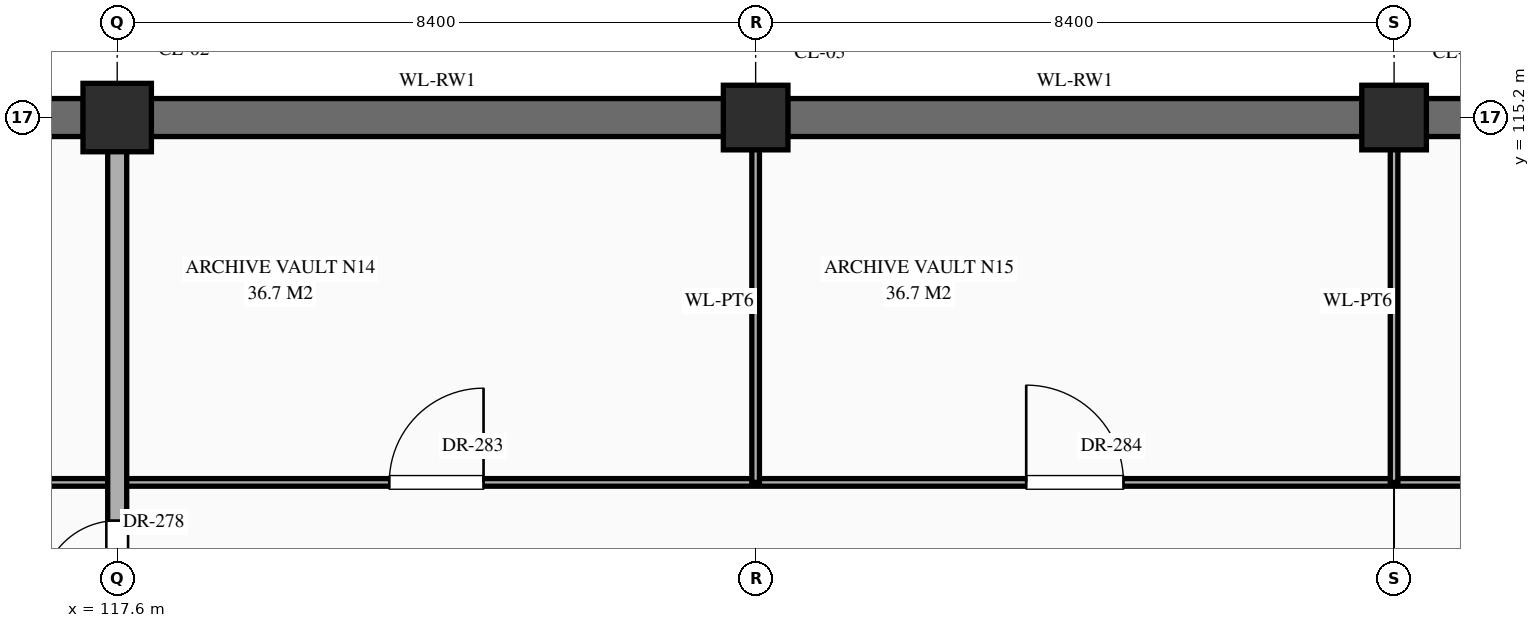
"""IFC4 building model, lengths in metres.
Left out: names, types, materials, properties, quantities, classifications, styles, units other than length and angle.
Written with IfcOpenShell. Run it as: python <this file> out.ifc"""

import sys

from ifc_helpers import new_model, si_unit, direction, frame, frame_2d, origin, origin_2d, place, context, subcontext, project, spatial, rectangle, extrude, element, fill, save


model = new_model("IFC4")
c1 = context("Model", 3, precision=1e-05, world=origin(), true_north=direction((0.0, 1.0)))
c2 = subcontext(c1, "Body", "Model", "MODEL_VIEW")
j1 = project(units=[si_unit("LENGTHUNIT", "METRE"), si_unit("PLANEANGLEUNIT", "RADIAN")], contexts=[c1])
p1 = place(None, origin())
s1 = spatial("IfcSite", under=j1, at=p1, CompositionType="ELEMENT")
p2 = place(p1, origin())
s2 = spatial("IfcBuilding", under=s1, at=p2, CompositionType="ELEMENT")
p3 = place(p2, frame((0.0, 0.0, -10.2)))
s3 = spatial("IfcBuildingStorey", under=s2, at=p3, CompositionType="ELEMENT", Elevation=-10.2)
p4 = place(p3, frame((117.6, 115.2, 0.0), z_axis=(0.0, 0.0, 1.0), x_axis=(1.0, 0.0, 0.0)))
e1 = element("IfcColumn", 1, at=p4, inside=s3, PredefinedType="COLUMN", context=c2, shape_type="SweptSolid", body=[
    extrude(rectangle(XDim=0.9, YDim=0.9, at=origin_2d()), origin(), (0.0, 0.0, 1.0), 4.8),
])
for number, where, z_axis, x_axis in (
    (2, (126.0, 115.2, 0.0), (0.0, 0.0, 1.0), (1.0, 0.0, 0.0)),
    (3, (134.4, 115.2, 0.0), (0.0, 0.0, 1.0), (1.0, 0.0, 0.0)),
):
    element("IfcColumn", number, at=place(p3, frame(where, z_axis=z_axis, x_axis=x_axis)), inside=s3, PredefinedType="COLUMN", context=c2, shape_type="SweptSolid", body=[
        extrude(rectangle(XDim=0.85, YDim=0.85, at=origin_2d()), origin(), (0.0, 0.0, 1.0), 4.8),
    ])
p5 = place(p3, frame((109.645, 115.2, 0.0), z_axis=(0.0, 0.0, 1.0), x_axis=(1.0, 0.0, 0.0)))
e4 = element("IfcWall", 4, at=p5, inside=s3, PredefinedType="USERDEFINED", context=c2, shape_type="SweptSolid", body=[
    extrude(rectangle(XDim=7.51, YDim=0.5, at=frame_2d((3.755, 0.0))), origin(), (0.0, 0.0, 1.0), 4.48),
])
p6 = place(p3, frame((118.045, 115.2, 0.0), z_axis=(0.0, 0.0, 1.0), x_axis=(1.0, 0.0, 0.0)))
e5 = element("IfcWall", 5, at=p6, inside=s3, PredefinedType="USERDEFINED", context=c2, shape_type="SweptSolid", body=[
    extrude(rectangle(XDim=7.535, YDim=0.5, at=frame_2d((3.768, 0.0))), origin(), (0.0, 0.0, 1.0), 4.48),
])
p7 = place(p3, frame((126.42, 115.2, 0.0), z_axis=(0.0, 0.0, 1.0), x_axis=(1.0, 0.0, 0.0)))
e6 = element("IfcWall", 6, at=p7, inside=s3, PredefinedType="USERDEFINED", context=c2, shape_type="SweptSolid", body=[
    extrude(rectangle(XDim=7.56, YDim=0.5, at=frame_2d((3.78, 0.0))), origin(), (0.0, 0.0, 1.0), 4.48),
])
p8 = place(p3, frame((134.82, 115.2, 0.0), z_axis=(0.0, 0.0, 1.0), x_axis=(1.0, 0.0, 0.0)))
e7 = element("IfcWall", 7, at=p8, inside=s3, PredefinedType="USERDEFINED", context=c2, shape_type="SweptSolid", body=[
    extrude(rectangle(XDim=7.56, YDim=0.5, at=frame_2d((3.78, 0.0))), origin(), (0.0, 0.0, 1.0), 4.48),
])
p9 = place(p3, frame((0.04, 110.4, 0.0), z_axis=(0.0, 0.0, 1.0), x_axis=(1.0, 0.0, 0.0)))
e8 = element("IfcWall", 8, at=p9, inside=s3, PredefinedType="STANDARD", context=c2, shape_type="SweptSolid", body=[
    extrude(rectangle(XDim=167.92, YDim=0.1, at=frame_2d((83.96, 0.0))), origin(), (0.0, 0.0, 1.0), 4.48),
])
p10 = place(p9, frame((3.54, 0.0, 0.0)))
e9 = element("IfcOpeningElement", 9, at=p10, cuts=e8, PredefinedType="OPENING", context=c2, shape_type="SweptSolid", body=[
    extrude(rectangle(XDim=1.28, YDim=2.35, at=frame_2d((0.64, 1.175))), frame((0.0, 0.062, 0.0), z_axis=(0.0, -1.0, 0.0), x_axis=(1.0, 0.0, 0.0)), (0.0, 0.0, 1.0), 0.124),
])
p11 = place(p9, frame((12.09, 0.0, 0.0)))
e10 = element("IfcOpeningElement", 10, at=p11, cuts=e8, PredefinedType="OPENING", context=c2, shape_type="SweptSolid", body=[
    extrude(rectangle(XDim=0.94, YDim=2.3, at=frame_2d((0.47, 1.15))), frame((0.0, 0.062, 0.0), z_axis=(0.0, -1.0, 0.0), x_axis=(1.0, 0.0, 0.0)), (0.0, 0.0, 1.0), 0.124),
])
p12 = place(p9, frame((20.47, 0.0, 0.0)))
e11 = element("IfcOpeningElement", 11, at=p12, cuts=e8, PredefinedType="OPENING", context=c2, shape_type="SweptSolid", body=[
    extrude(rectangle(XDim=0.98, YDim=2.35, at=frame_2d((0.49, 1.175))), frame((0.0, 0.062, 0.0), z_axis=(0.0, -1.0, 0.0), x_axis=(1.0, 0.0, 0.0)), (0.0, 0.0, 1.0), 0.124),
])
p13 = place(p9, frame((28.85, 0.0, 0.0)))
e12 = element("IfcOpeningElement", 12, at=p13, cuts=e8, PredefinedType="OPENING", context=c2, shape_type="SweptSolid", body=[
    extrude(rectangle(XDim=1.02, YDim=2.4, at=frame_2d((0.51, 1.2))), frame((0.0, 0.062, 0.0), z_axis=(0.0, -1.0, 0.0), x_axis=(1.0, 0.0, 0.0)), (0.0, 0.0, 1.0), 0.124),
])
p14 = place(p9, frame((37.23, 0.0, 0.0)))
e13 = element("IfcOpeningElement", 13, at=p14, cuts=e8, PredefinedType="OPENING", context=c2, shape_type="SweptSolid", body=[
    extrude(rectangle(XDim=1.06, YDim=2.4, at=frame_2d((0.53, 1.2))), frame((0.0, 0.062, 0.0), z_axis=(0.0, -1.0, 0.0), x_axis=(1.0, 0.0, 0.0)), (0.0, 0.0, 1.0), 0.124),
])
p15 = place(p9, frame((45.59, 0.0, 0.0)))
e14 = element("IfcOpeningElement", 14, at=p15, cuts=e8, PredefinedType="OPENING", context=c2, shape_type="SweptSolid", body=[
    extrude(rectangle(XDim=1.14, YDim=2.4, at=frame_2d((0.57, 1.2))), frame((0.0, 0.062, 0.0), z_axis=(0.0, -1.0, 0.0), x_axis=(1.0, 0.0, 0.0)), (0.0, 0.0, 1.0), 0.124),
])
p16 = place(p9, frame((54.13, 0.0, 0.0)))
e15 = element("IfcOpeningElement", 15, at=p16, cuts=e8, PredefinedType="OPENING", context=c2, shape_type="SweptSolid", body=[
    extrude(rectangle(XDim=0.86, YDim=2.1, at=frame_2d((0.43, 1.05))), frame((0.0, 0.062, 0.0), z_axis=(0.0, -1.0, 0.0), x_axis=(1.0, 0.0, 0.0)), (0.0, 0.0, 1.0), 0.124),
])
p17 = place(p9, frame((62.5, 0.0, 0.0)))
e16 = element("IfcOpeningElement", 16, at=p17, cuts=e8, PredefinedType="OPENING", context=c2, shape_type="SweptSolid", body=[
    extrude(rectangle(XDim=0.92, YDim=2.15, at=frame_2d((0.46, 1.075))), frame((0.0, 0.062, 0.0), z_axis=(0.0, -1.0, 0.0), x_axis=(1.0, 0.0, 0.0)), (0.0, 0.0, 1.0), 0.124),
])
p18 = place(p9, frame((70.88, 0.0, 0.0)))
e17 = element("IfcOpeningElement", 17, at=p18, cuts=e8, PredefinedType="OPENING", context=c2, shape_type="SweptSolid", body=[
    extrude(rectangle(XDim=0.96, YDim=2.2, at=frame_2d((0.48, 1.1))), frame((0.0, 0.062, 0.0), z_axis=(0.0, -1.0, 0.0), x_axis=(1.0, 0.0, 0.0)), (0.0, 0.0, 1.0), 0.124),
])
p19 = place(p9, frame((79.26, 0.0, 0.0)))
e18 = element("IfcOpeningElement", 18, at=p19, cuts=e8, PredefinedType="OPENING", context=c2, shape_type="SweptSolid", body=[
    extrude(rectangle(XDim=1.0, YDim=2.25, at=frame_2d((0.5, 1.125))), frame((0.0, 0.062, 0.0), z_axis=(0.0, -1.0, 0.0), x_axis=(1.0, 0.0, 0.0)), (0.0, 0.0, 1.0), 0.124),
])
p20 = place(p9, frame((87.62, 0.0, 0.0)))
e19 = element("IfcOpeningElement", 19, at=p20, cuts=e8, PredefinedType="OPENING", context=c2, shape_type="SweptSolid", body=[
    extrude(rectangle(XDim=1.08, YDim=2.25, at=frame_2d((0.54, 1.125))), frame((0.0, 0.062, 0.0), z_axis=(0.0, -1.0, 0.0), x_axis=(1.0, 0.0, 0.0)), (0.0, 0.0, 1.0), 0.124),
])
p21 = place(p9, frame((96.0, 0.0, 0.0)))
e20 = element("IfcOpeningElement", 20, at=p21, cuts=e8, PredefinedType="OPENING", context=c2, shape_type="SweptSolid", body=[
    extrude(rectangle(XDim=1.12, YDim=2.25, at=frame_2d((0.56, 1.125))), frame((0.0, 0.062, 0.0), z_axis=(0.0, -1.0, 0.0), x_axis=(1.0, 0.0, 0.0)), (0.0, 0.0, 1.0), 0.124),
])
p22 = place(p9, frame((104.38, 0.0, 0.0)))
e21 = element("IfcOpeningElement", 21, at=p22, cuts=e8, PredefinedType="OPENING", context=c2, shape_type="SweptSolid", body=[
    extrude(rectangle(XDim=1.16, YDim=2.3, at=frame_2d((0.58, 1.15))), frame((0.0, 0.062, 0.0), z_axis=(0.0, -1.0, 0.0), x_axis=(1.0, 0.0, 0.0)), (0.0, 0.0, 1.0), 0.124),
])
p23 = place(p9, frame((112.76, 0.0, 0.0)))
e22 = element("IfcOpeningElement", 22, at=p23, cuts=e8, PredefinedType="OPENING", context=c2, shape_type="SweptSolid", body=[
    extrude(rectangle(XDim=1.2, YDim=2.35, at=frame_2d((0.6, 1.175))), frame((0.0, 0.062, 0.0), z_axis=(0.0, -1.0, 0.0), x_axis=(1.0, 0.0, 0.0)), (0.0, 0.0, 1.0), 0.124),
])
p24 = place(p9, frame((121.14, 0.0, 0.0)))
e23 = element("IfcOpeningElement", 23, at=p24, cuts=e8, PredefinedType="OPENING", context=c2, shape_type="SweptSolid", body=[
    extrude(rectangle(XDim=1.24, YDim=2.3, at=frame_2d((0.62, 1.15))), frame((0.0, 0.062, 0.0), z_axis=(0.0, -1.0, 0.0), x_axis=(1.0, 0.0, 0.0)), (0.0, 0.0, 1.0), 0.124),
])
p25 = place(p9, frame((129.52, 0.0, 0.0)))
e24 = element("IfcOpeningElement", 24, at=p25, cuts=e8, PredefinedType="OPENING", context=c2, shape_type="SweptSolid", body=[
    extrude(rectangle(XDim=1.28, YDim=2.35, at=frame_2d((0.64, 1.175))), frame((0.0, 0.062, 0.0), z_axis=(0.0, -1.0, 0.0), x_axis=(1.0, 0.0, 0.0)), (0.0, 0.0, 1.0), 0.124),
])
p26 = place(p9, frame((138.09, 0.0, 0.0)))
e25 = element("IfcOpeningElement", 25, at=p26, cuts=e8, PredefinedType="OPENING", context=c2, shape_type="SweptSolid", body=[
    extrude(rectangle(XDim=0.94, YDim=2.3, at=frame_2d((0.47, 1.15))), frame((0.0, 0.062, 0.0), z_axis=(0.0, -1.0, 0.0), x_axis=(1.0, 0.0, 0.0)), (0.0, 0.0, 1.0), 0.124),
])
p27 = place(p9, frame((146.47, 0.0, 0.0)))
e26 = element("IfcOpeningElement", 26, at=p27, cuts=e8, PredefinedType="OPENING", context=c2, shape_type="SweptSolid", body=[
    extrude(rectangle(XDim=0.98, YDim=2.35, at=frame_2d((0.49, 1.175))), frame((0.0, 0.062, 0.0), z_axis=(0.0, -1.0, 0.0), x_axis=(1.0, 0.0, 0.0)), (0.0, 0.0, 1.0), 0.124),
])
p28 = place(p9, frame((154.85, 0.0, 0.0)))
e27 = element("IfcOpeningElement", 27, at=p28, cuts=e8, PredefinedType="OPENING", context=c2, shape_type="SweptSolid", body=[
    extrude(rectangle(XDim=1.02, YDim=2.4, at=frame_2d((0.51, 1.2))), frame((0.0, 0.062, 0.0), z_axis=(0.0, -1.0, 0.0), x_axis=(1.0, 0.0, 0.0)), (0.0, 0.0, 1.0), 0.124),
])
p29 = place(p9, frame((163.21, 0.0, 0.0)))
e28 = element("IfcOpeningElement", 28, at=p29, cuts=e8, PredefinedType="OPENING", context=c2, shape_type="SweptSolid", body=[
    extrude(rectangle(XDim=1.06, YDim=2.4, at=frame_2d((0.53, 1.2))), frame((0.0, 0.062, 0.0), z_axis=(0.0, -1.0, 0.0), x_axis=(1.0, 0.0, 0.0)), (0.0, 0.0, 1.0), 0.124),
])
p30 = place(p3, frame((117.6, 91.2, 0.0), z_axis=(0.0, 0.0, 1.0), x_axis=(0.0, 1.0, 0.0)))
e29 = element("IfcWall", 29, at=p30, inside=s3, PredefinedType="STANDARD", context=c2, shape_type="SweptSolid", body=[
    extrude(rectangle(XDim=23.96, YDim=0.25, at=frame_2d((11.98, 0.0))), origin(), (0.0, 0.0, 1.0), 3.73),
])
p31 = place(p30, frame((0.452, 0.0, 0.0)))
e30 = element("IfcOpeningElement", 30, at=p31, cuts=e29, PredefinedType="OPENING", context=c2, shape_type="SweptSolid", body=[
    extrude(rectangle(XDim=1.1, YDim=2.2, at=frame_2d((0.55, 1.1))), frame((0.0, 0.137, 0.0), z_axis=(0.0, -1.0, 0.0), x_axis=(1.0, 0.0, 0.0)), (0.0, 0.0, 1.0), 0.274),
])
p32 = place(p30, frame((10.498, 0.0, 0.0)))
e31 = element("IfcOpeningElement", 31, at=p32, cuts=e29, PredefinedType="OPENING", context=c2, shape_type="SweptSolid", body=[
    extrude(rectangle(XDim=1.0, YDim=2.2, at=frame_2d((0.5, 1.1))), frame((0.0, 0.137, 0.0), z_axis=(0.0, -1.0, 0.0), x_axis=(1.0, 0.0, 0.0)), (0.0, 0.0, 1.0), 0.274),
])
p33 = place(p30, frame((3.323, 0.0, 0.0)))
e32 = element("IfcOpeningElement", 32, at=p33, cuts=e29, PredefinedType="OPENING", context=c2, shape_type="SweptSolid", body=[
    extrude(rectangle(XDim=0.95, YDim=2.15, at=frame_2d((0.475, 1.075))), frame((0.0, 0.137, 0.0), z_axis=(0.0, -1.0, 0.0), x_axis=(1.0, 0.0, 0.0)), (0.0, 0.0, 1.0), 0.274),
])
p34 = place(p30, frame((17.698, 0.0, 0.0)))
e33 = element("IfcOpeningElement", 33, at=p34, cuts=e29, PredefinedType="OPENING", context=c2, shape_type="SweptSolid", body=[
    extrude(rectangle(XDim=1.0, YDim=2.2, at=frame_2d((0.5, 1.1))), frame((0.0, 0.137, 0.0), z_axis=(0.0, -1.0, 0.0), x_axis=(1.0, 0.0, 0.0)), (0.0, 0.0, 1.0), 0.274),
])
for number, where, z_axis, x_axis in (
    (34, (126.0, 110.4, 0.0), (0.0, 0.0, 1.0), (0.0, 1.0, 0.0)),
    (35, (134.4, 110.4, 0.0), (0.0, 0.0, 1.0), (0.0, 1.0, 0.0)),
):
    element("IfcWall", number, at=place(p3, frame(where, z_axis=z_axis, x_axis=x_axis)), inside=s3, PredefinedType="STANDARD", context=c2, shape_type="SweptSolid", body=[
        extrude(rectangle(XDim=4.76, YDim=0.1, at=frame_2d((2.38, 0.0))), origin(), (0.0, 0.0, 1.0), 3.73),
    ])
p35 = place(p34, origin())
e36 = element("IfcDoor", 36, at=p35, inside=s3, OperationType="SINGLE_SWING_LEFT", PredefinedType="DOOR", context=c2, shape_type="SweptSolid", body=[
    extrude(rectangle(XDim=1.0, YDim=2.2, at=frame_2d((0.5, 1.1))), frame((0.0, 0.025, 0.0), z_axis=(0.0, -1.0, 0.0), x_axis=(1.0, 0.0, 0.0)), (0.0, 0.0, 1.0), 0.05),
])
fill(e33, e36)
p36 = place(p24, origin())
e37 = element("IfcDoor", 37, at=p36, inside=s3, OperationType="SINGLE_SWING_RIGHT", PredefinedType="DOOR", context=c2, shape_type="SweptSolid", body=[
    extrude(rectangle(XDim=1.24, YDim=2.3, at=frame_2d((0.62, 1.15))), frame((0.0, 0.025, 0.0), z_axis=(0.0, -1.0, 0.0), x_axis=(1.0, 0.0, 0.0)), (0.0, 0.0, 1.0), 0.05),
])
fill(e23, e37)
p37 = place(p25, origin())
e38 = element("IfcDoor", 38, at=p37, inside=s3, OperationType="SINGLE_SWING_LEFT", PredefinedType="DOOR", context=c2, shape_type="SweptSolid", body=[
    extrude(rectangle(XDim=1.28, YDim=2.35, at=frame_2d((0.64, 1.175))), frame((0.0, 0.025, 0.0), z_axis=(0.0, -1.0, 0.0), x_axis=(1.0, 0.0, 0.0)), (0.0, 0.0, 1.0), 0.05),
])
fill(e24, e38)
save(model, sys.argv[1])
